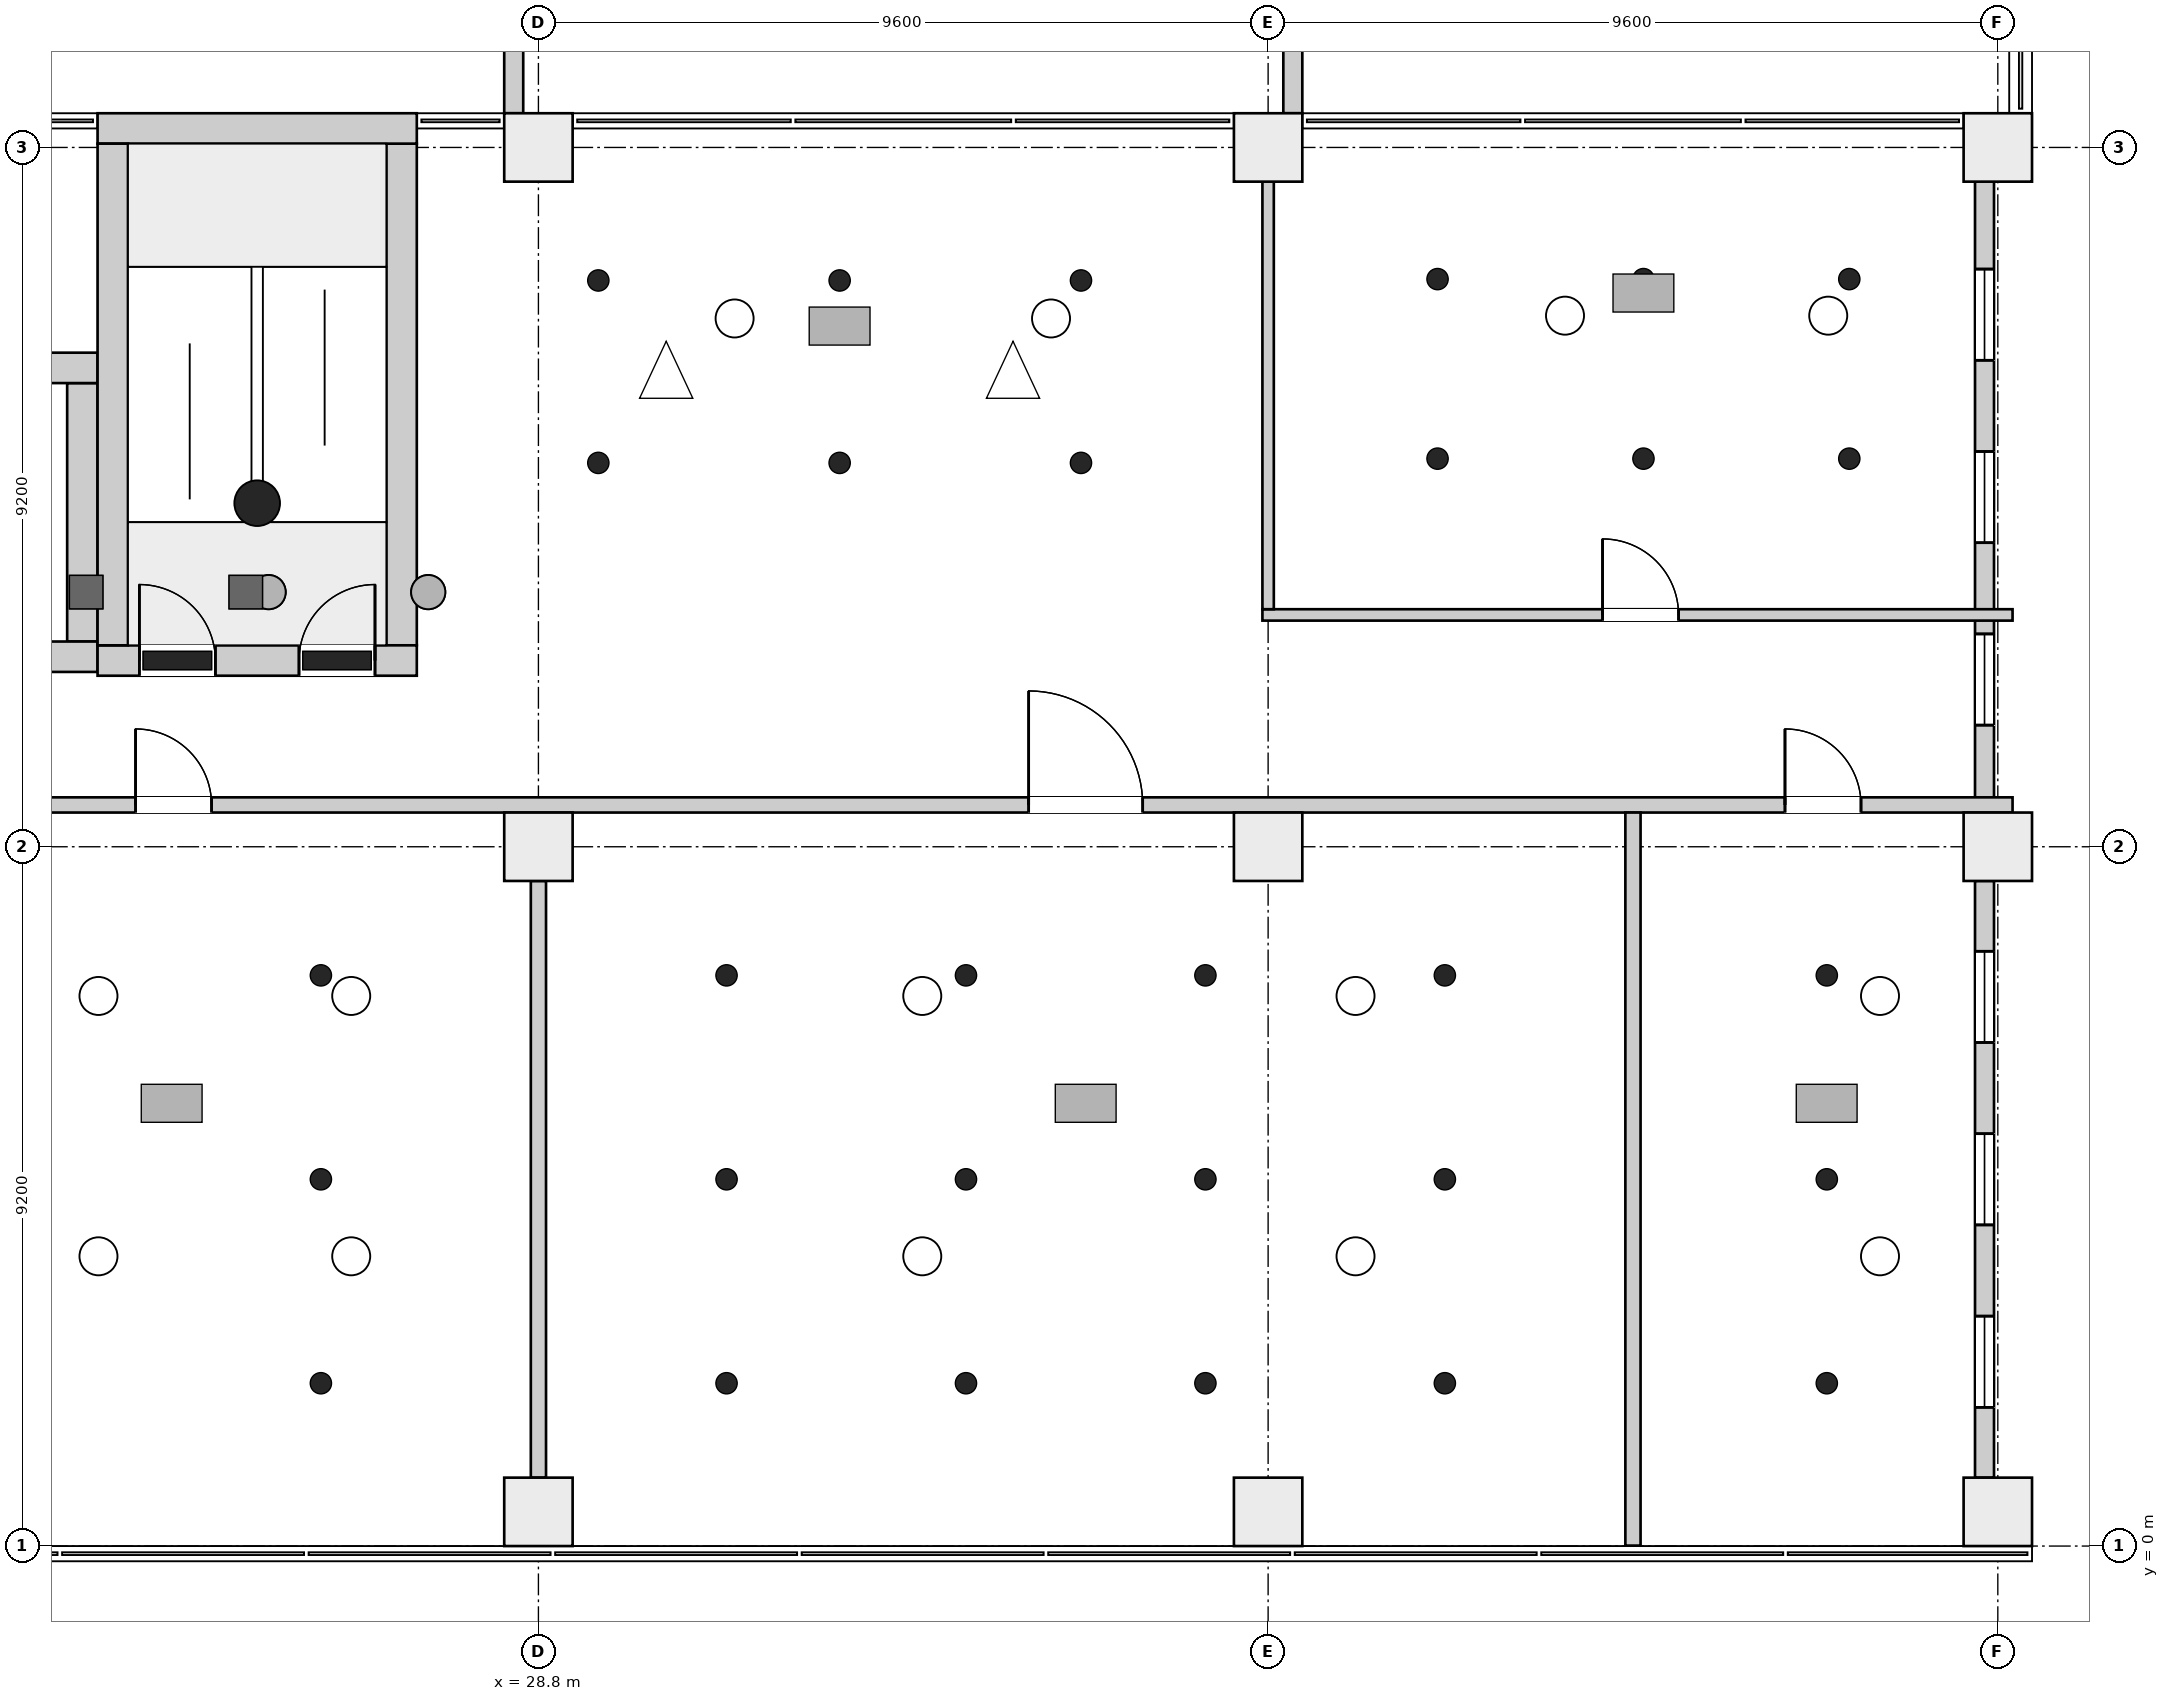
"""IFC4 building model, lengths in metres.
Left out: names, types, materials, properties, quantities, classifications, styles, units other than length and angle.
Written with IfcOpenShell. Run it as: python <this file> out.ifc"""

import sys

from ifc_helpers import new_model, si_unit, direction, frame, frame_2d, origin, origin_2d, place, context, subcontext, project, spatial, rectangle, extrude, element, fill, save


model = new_model("IFC4")
c1 = context("Model", 3, precision=1e-05, world=origin(), true_north=direction((0.0, 1.0)))
c2 = subcontext(c1, "Body", "Model", "MODEL_VIEW")
j1 = project(units=[si_unit("LENGTHUNIT", "METRE"), si_unit("PLANEANGLEUNIT", "RADIAN")], contexts=[c1])
p1 = place(None, origin())
s1 = spatial("IfcSite", under=j1, at=p1, CompositionType="ELEMENT")
p2 = place(p1, origin())
s2 = spatial("IfcBuilding", under=s1, at=p2, CompositionType="ELEMENT")
p3 = place(p2, frame((0.0, 0.0, 48.7)))
s3 = spatial("IfcBuildingStorey", under=s2, at=p3, CompositionType="ELEMENT", Elevation=48.7)
p4 = place(p3, frame((23.0, 11.65, 0.0), z_axis=(0.0, 0.0, 1.0), x_axis=(1.0, 0.0, 0.0)))
e1 = element("IfcWall", 1, at=p4, inside=s3, PredefinedType="SHEAR", context=c2, shape_type="SweptSolid", body=[
    extrude(rectangle(XDim=4.2, YDim=0.4, at=frame_2d((2.1, 0.0))), origin(), (0.0, 0.0, 1.0), 4.2),
])
p5 = place(p4, frame((0.55, 0.0, 0.0)))
e2 = element("IfcOpeningElement", 2, at=p5, cuts=e1, PredefinedType="OPENING", context=c2, shape_type="SweptSolid", body=[
    extrude(rectangle(XDim=1.0, YDim=2.1, at=frame_2d((0.5, 1.05))), frame((0.0, 0.21, 0.0), z_axis=(0.0, -1.0, 0.0), x_axis=(1.0, 0.0, 0.0)), (0.0, 0.0, 1.0), 0.42),
])
p6 = place(p4, frame((2.65, 0.0, 0.0)))
e3 = element("IfcOpeningElement", 3, at=p6, cuts=e1, PredefinedType="OPENING", context=c2, shape_type="SweptSolid", body=[
    extrude(rectangle(XDim=1.0, YDim=2.1, at=frame_2d((0.5, 1.05))), frame((0.0, 0.21, 0.0), z_axis=(0.0, -1.0, 0.0), x_axis=(1.0, 0.0, 0.0)), (0.0, 0.0, 1.0), 0.42),
])
p7 = place(p3, frame((23.0, 18.65, 0.0), z_axis=(0.0, 0.0, 1.0), x_axis=(1.0, 0.0, 0.0)))
e4 = element("IfcWall", 4, at=p7, inside=s3, PredefinedType="SHEAR", context=c2, shape_type="SweptSolid", body=[
    extrude(rectangle(XDim=4.2, YDim=0.4, at=frame_2d((2.1, 0.0))), origin(), (0.0, 0.0, 1.0), 4.2),
])
for number, where, z_axis, x_axis in (
    (5, (23.2, 11.85, 0.0), (0.0, 0.0, 1.0), (0.0, 1.0, 0.0)),
    (6, (27.0, 11.85, 0.0), (0.0, 0.0, 1.0), (0.0, 1.0, 0.0)),
):
    element("IfcWall", number, at=place(p3, frame(where, z_axis=z_axis, x_axis=x_axis)), inside=s3, PredefinedType="SHEAR", context=c2, shape_type="SweptSolid", body=[
        extrude(rectangle(XDim=6.6, YDim=0.4, at=frame_2d((3.3, 0.0))), origin(), (0.0, 0.0, 1.0), 4.2),
    ])
p8 = place(p3, frame((19.9, 11.7, 0.0), z_axis=(0.0, 0.0, 1.0), x_axis=(1.0, 0.0, 0.0)))
e7 = element("IfcWall", 7, at=p8, inside=s3, PredefinedType="SHEAR", context=c2, shape_type="SweptSolid", body=[
    extrude(rectangle(XDim=3.1, YDim=0.4, at=frame_2d((1.55, 0.0))), origin(), (0.0, 0.0, 1.0), 4.2),
])
p9 = place(p3, frame((19.9, 15.5, 0.0), z_axis=(0.0, 0.0, 1.0), x_axis=(1.0, 0.0, 0.0)))
e8 = element("IfcWall", 8, at=p9, inside=s3, PredefinedType="SHEAR", context=c2, shape_type="SweptSolid", body=[
    extrude(rectangle(XDim=3.1, YDim=0.4, at=frame_2d((1.55, 0.0))), origin(), (0.0, 0.0, 1.0), 4.2),
])
p10 = place(p9, frame((0.95, 0.0, 0.0)))
e9 = element("IfcOpeningElement", 9, at=p10, cuts=e8, PredefinedType="OPENING", context=c2, shape_type="SweptSolid", body=[
    extrude(rectangle(XDim=1.2, YDim=2.1, at=frame_2d((0.6, 1.05))), frame((0.0, 0.21, 0.0), z_axis=(0.0, -1.0, 0.0), x_axis=(1.0, 0.0, 0.0)), (0.0, 0.0, 1.0), 0.42),
])
p11 = place(p3, frame((22.8, 11.9, 0.0), z_axis=(0.0, 0.0, 1.0), x_axis=(0.0, 1.0, 0.0)))
e10 = element("IfcWall", 10, at=p11, inside=s3, PredefinedType="SHEAR", context=c2, shape_type="SweptSolid", body=[
    extrude(rectangle(XDim=3.4, YDim=0.4, at=frame_2d((1.7, 0.0))), origin(), (0.0, 0.0, 1.0), 4.2),
])
for number, where, z_axis, x_axis in (
    (11, (28.8, 0.45, 0.0), (0.0, 0.0, 1.0), (1.0, 0.0, 0.0)),
    (12, (38.4, 0.45, 0.0), (0.0, 0.0, 1.0), (1.0, 0.0, 0.0)),
    (13, (48.0, 0.45, 0.0), (0.0, 0.0, 1.0), (1.0, 0.0, 0.0)),
    (14, (28.8, 9.2, 0.0), (0.0, 0.0, 1.0), (1.0, 0.0, 0.0)),
    (15, (38.4, 9.2, 0.0), (0.0, 0.0, 1.0), (1.0, 0.0, 0.0)),
    (16, (48.0, 9.2, 0.0), (0.0, 0.0, 1.0), (1.0, 0.0, 0.0)),
    (17, (28.8, 18.4, 0.0), (0.0, 0.0, 1.0), (1.0, 0.0, 0.0)),
    (18, (38.4, 18.4, 0.0), (0.0, 0.0, 1.0), (1.0, 0.0, 0.0)),
    (19, (48.0, 18.4, 0.0), (0.0, 0.0, 1.0), (1.0, 0.0, 0.0)),
):
    element("IfcColumn", number, at=place(p3, frame(where, z_axis=z_axis, x_axis=x_axis)), inside=s3, PredefinedType="COLUMN", context=c2, shape_type="SweptSolid", body=[
        extrude(rectangle(XDim=0.9, YDim=0.9, at=origin_2d()), origin(), (0.0, 0.0, 1.0), 4.2),
    ])
p12 = place(p3, frame((47.825, 0.9, 0.0), z_axis=(0.0, 0.0, 1.0), x_axis=(0.0, 1.0, 0.0)))
e20 = element("IfcWall", 20, at=p12, inside=s3, PredefinedType="ELEMENTEDWALL", context=c2, shape_type="SweptSolid", body=[
    extrude(rectangle(XDim=7.85, YDim=0.25, at=frame_2d((3.925, 0.0))), origin(), (0.0, 0.0, 1.0), 3.3),
])
p13 = place(p12, frame((0.925, 0.0, 0.6)))
e21 = element("IfcOpeningElement", 21, at=p13, cuts=e20, PredefinedType="OPENING", context=c2, shape_type="SweptSolid", body=[
    extrude(rectangle(XDim=1.2, YDim=2.6, at=frame_2d((0.6, 1.3))), frame((0.0, 0.135, 0.0), z_axis=(0.0, -1.0, 0.0), x_axis=(1.0, 0.0, 0.0)), (0.0, 0.0, 1.0), 0.27),
])
p14 = place(p12, frame((3.325, 0.0, 0.6)))
e22 = element("IfcOpeningElement", 22, at=p14, cuts=e20, PredefinedType="OPENING", context=c2, shape_type="SweptSolid", body=[
    extrude(rectangle(XDim=1.2, YDim=2.6, at=frame_2d((0.6, 1.3))), frame((0.0, 0.135, 0.0), z_axis=(0.0, -1.0, 0.0), x_axis=(1.0, 0.0, 0.0)), (0.0, 0.0, 1.0), 0.27),
])
p15 = place(p12, frame((5.725, 0.0, 0.6)))
e23 = element("IfcOpeningElement", 23, at=p15, cuts=e20, PredefinedType="OPENING", context=c2, shape_type="SweptSolid", body=[
    extrude(rectangle(XDim=1.2, YDim=2.6, at=frame_2d((0.6, 1.3))), frame((0.0, 0.135, 0.0), z_axis=(0.0, -1.0, 0.0), x_axis=(1.0, 0.0, 0.0)), (0.0, 0.0, 1.0), 0.27),
])
p16 = place(p3, frame((47.825, 9.65, 0.0), z_axis=(0.0, 0.0, 1.0), x_axis=(0.0, 1.0, 0.0)))
e24 = element("IfcWall", 24, at=p16, inside=s3, PredefinedType="ELEMENTEDWALL", context=c2, shape_type="SweptSolid", body=[
    extrude(rectangle(XDim=8.3, YDim=0.25, at=frame_2d((4.15, 0.0))), origin(), (0.0, 0.0, 1.0), 3.3),
])
p17 = place(p16, frame((1.15, 0.0, 0.6)))
e25 = element("IfcOpeningElement", 25, at=p17, cuts=e24, PredefinedType="OPENING", context=c2, shape_type="SweptSolid", body=[
    extrude(rectangle(XDim=1.2, YDim=2.6, at=frame_2d((0.6, 1.3))), frame((0.0, 0.135, 0.0), z_axis=(0.0, -1.0, 0.0), x_axis=(1.0, 0.0, 0.0)), (0.0, 0.0, 1.0), 0.27),
])
p18 = place(p16, frame((3.55, 0.0, 0.6)))
e26 = element("IfcOpeningElement", 26, at=p18, cuts=e24, PredefinedType="OPENING", context=c2, shape_type="SweptSolid", body=[
    extrude(rectangle(XDim=1.2, YDim=2.6, at=frame_2d((0.6, 1.3))), frame((0.0, 0.135, 0.0), z_axis=(0.0, -1.0, 0.0), x_axis=(1.0, 0.0, 0.0)), (0.0, 0.0, 1.0), 0.27),
])
p19 = place(p16, frame((5.95, 0.0, 0.6)))
e27 = element("IfcOpeningElement", 27, at=p19, cuts=e24, PredefinedType="OPENING", context=c2, shape_type="SweptSolid", body=[
    extrude(rectangle(XDim=1.2, YDim=2.6, at=frame_2d((0.6, 1.3))), frame((0.0, 0.135, 0.0), z_axis=(0.0, -1.0, 0.0), x_axis=(1.0, 0.0, 0.0)), (0.0, 0.0, 1.0), 0.27),
])
for number, where, z_axis, x_axis in (
    (28, (38.725, 18.85, 4.2), (0.0, 0.0, 1.0), (0.0, 1.0, 0.0)),
    (29, (28.475, 27.15, 4.2), (0.0, 0.0, 1.0), (0.0, -1.0, 0.0)),
):
    element("IfcWall", number, at=place(p3, frame(where, z_axis=z_axis, x_axis=x_axis)), inside=s3, PredefinedType="PARAPET", context=c2, shape_type="SweptSolid", body=[
        extrude(rectangle(XDim=8.3, YDim=0.25, at=frame_2d((4.15, 0.0))), origin(), (0.0, 0.0, 1.0), 1.1),
    ])
p20 = place(p3, frame((4.3, 9.75, 0.0), z_axis=(0.0, 0.0, 1.0), x_axis=(1.0, 0.0, 0.0)))
e30 = element("IfcWall", 30, at=p20, inside=s3, PredefinedType="PARTITIONING", context=c2, shape_type="SweptSolid", body=[
    extrude(rectangle(XDim=43.894, YDim=0.2, at=frame_2d((21.947, 0.0))), origin(), (0.0, 0.0, 1.0), 3.9),
])
p21 = place(p20, frame((7.0, 0.0, 0.0)))
e31 = element("IfcOpeningElement", 31, at=p21, cuts=e30, PredefinedType="OPENING", context=c2, shape_type="SweptSolid", body=[
    extrude(rectangle(XDim=1.0, YDim=2.1, at=frame_2d((0.5, 1.05))), frame((0.0, 0.11, 0.0), z_axis=(0.0, -1.0, 0.0), x_axis=(1.0, 0.0, 0.0)), (0.0, 0.0, 1.0), 0.22),
])
p22 = place(p20, frame((19.2, 0.0, 0.0)))
e32 = element("IfcOpeningElement", 32, at=p22, cuts=e30, PredefinedType="OPENING", context=c2, shape_type="SweptSolid", body=[
    extrude(rectangle(XDim=1.0, YDim=2.1, at=frame_2d((0.5, 1.05))), frame((0.0, 0.11, 0.0), z_axis=(0.0, -1.0, 0.0), x_axis=(1.0, 0.0, 0.0)), (0.0, 0.0, 1.0), 0.22),
])
p23 = place(p20, frame((30.95, 0.0, 0.0)))
e33 = element("IfcOpeningElement", 33, at=p23, cuts=e30, PredefinedType="OPENING", context=c2, shape_type="SweptSolid", body=[
    extrude(rectangle(XDim=1.5, YDim=2.1, at=frame_2d((0.75, 1.05))), frame((0.0, 0.11, 0.0), z_axis=(0.0, -1.0, 0.0), x_axis=(1.0, 0.0, 0.0)), (0.0, 0.0, 1.0), 0.22),
])
p24 = place(p20, frame((40.9, 0.0, 0.0)))
e34 = element("IfcOpeningElement", 34, at=p24, cuts=e30, PredefinedType="OPENING", context=c2, shape_type="SweptSolid", body=[
    extrude(rectangle(XDim=1.0, YDim=2.1, at=frame_2d((0.5, 1.05))), frame((0.0, 0.11, 0.0), z_axis=(0.0, -1.0, 0.0), x_axis=(1.0, 0.0, 0.0)), (0.0, 0.0, 1.0), 0.22),
])
p25 = place(p3, frame((28.8, 0.9, 0.0), z_axis=(0.0, 0.0, 1.0), x_axis=(0.0, 1.0, 0.0)))
e35 = element("IfcWall", 35, at=p25, inside=s3, PredefinedType="PARTITIONING", context=c2, shape_type="SweptSolid", body=[
    extrude(rectangle(XDim=7.85, YDim=0.2, at=frame_2d((3.925, 0.0))), origin(), (0.0, 0.0, 1.0), 3.9),
])
p26 = place(p3, frame((38.325, 12.25, 0.0), z_axis=(0.0, 0.0, 1.0), x_axis=(1.0, 0.0, 0.0)))
e36 = element("IfcWall", 36, at=p26, inside=s3, PredefinedType="PARTITIONING", context=c2, shape_type="SweptSolid", body=[
    extrude(rectangle(XDim=9.869, YDim=0.15, at=frame_2d((4.935, 0.0))), origin(), (0.0, 0.0, 1.0), 3.9),
])
p27 = place(p26, frame((4.475, 0.0, 0.0)))
e37 = element("IfcOpeningElement", 37, at=p27, cuts=e36, PredefinedType="OPENING", context=c2, shape_type="SweptSolid", body=[
    extrude(rectangle(XDim=1.0, YDim=2.1, at=frame_2d((0.5, 1.05))), frame((0.0, 0.085, 0.0), z_axis=(0.0, -1.0, 0.0), x_axis=(1.0, 0.0, 0.0)), (0.0, 0.0, 1.0), 0.17),
])
p28 = place(p3, frame((38.4, 12.325, 0.0), z_axis=(0.0, 0.0, 1.0), x_axis=(0.0, 1.0, 0.0)))
e38 = element("IfcWall", 38, at=p28, inside=s3, PredefinedType="PARTITIONING", context=c2, shape_type="SweptSolid", body=[
    extrude(rectangle(XDim=5.625, YDim=0.15, at=frame_2d((2.812, 0.0))), origin(), (0.0, 0.0, 1.0), 3.9),
])
p29 = place(p3, frame((43.2, 0.006, 0.0), z_axis=(0.0, 0.0, 1.0), x_axis=(0.0, 1.0, 0.0)))
e39 = element("IfcWall", 39, at=p29, inside=s3, PredefinedType="PARTITIONING", context=c2, shape_type="SweptSolid", body=[
    extrude(rectangle(XDim=9.644, YDim=0.2, at=frame_2d((4.822, 0.0))), origin(), (0.0, 0.0, 1.0), 3.9),
])
p30 = place(p13, origin())
e40 = element("IfcWindow", 40, at=p30, inside=s3, PartitioningType="SINGLE_PANEL", PredefinedType="WINDOW", context=c2, shape_type="SweptSolid", body=[
    extrude(rectangle(XDim=1.2, YDim=2.6, at=frame_2d((0.6, 1.3))), frame((0.0, 0.03, 0.0), z_axis=(0.0, -1.0, 0.0), x_axis=(1.0, 0.0, 0.0)), (0.0, 0.0, 1.0), 0.06),
])
fill(e21, e40)
p31 = place(p14, origin())
e41 = element("IfcWindow", 41, at=p31, inside=s3, PartitioningType="SINGLE_PANEL", PredefinedType="WINDOW", context=c2, shape_type="SweptSolid", body=[
    extrude(rectangle(XDim=1.2, YDim=2.6, at=frame_2d((0.6, 1.3))), frame((0.0, 0.03, 0.0), z_axis=(0.0, -1.0, 0.0), x_axis=(1.0, 0.0, 0.0)), (0.0, 0.0, 1.0), 0.06),
])
fill(e22, e41)
p32 = place(p15, origin())
e42 = element("IfcWindow", 42, at=p32, inside=s3, PartitioningType="SINGLE_PANEL", PredefinedType="WINDOW", context=c2, shape_type="SweptSolid", body=[
    extrude(rectangle(XDim=1.2, YDim=2.6, at=frame_2d((0.6, 1.3))), frame((0.0, 0.03, 0.0), z_axis=(0.0, -1.0, 0.0), x_axis=(1.0, 0.0, 0.0)), (0.0, 0.0, 1.0), 0.06),
])
fill(e23, e42)
p33 = place(p17, origin())
e43 = element("IfcWindow", 43, at=p33, inside=s3, PartitioningType="SINGLE_PANEL", PredefinedType="WINDOW", context=c2, shape_type="SweptSolid", body=[
    extrude(rectangle(XDim=1.2, YDim=2.6, at=frame_2d((0.6, 1.3))), frame((0.0, 0.03, 0.0), z_axis=(0.0, -1.0, 0.0), x_axis=(1.0, 0.0, 0.0)), (0.0, 0.0, 1.0), 0.06),
])
fill(e25, e43)
p34 = place(p18, origin())
e44 = element("IfcWindow", 44, at=p34, inside=s3, PartitioningType="SINGLE_PANEL", PredefinedType="WINDOW", context=c2, shape_type="SweptSolid", body=[
    extrude(rectangle(XDim=1.2, YDim=2.6, at=frame_2d((0.6, 1.3))), frame((0.0, 0.03, 0.0), z_axis=(0.0, -1.0, 0.0), x_axis=(1.0, 0.0, 0.0)), (0.0, 0.0, 1.0), 0.06),
])
fill(e26, e44)
p35 = place(p19, origin())
e45 = element("IfcWindow", 45, at=p35, inside=s3, PartitioningType="SINGLE_PANEL", PredefinedType="WINDOW", context=c2, shape_type="SweptSolid", body=[
    extrude(rectangle(XDim=1.2, YDim=2.6, at=frame_2d((0.6, 1.3))), frame((0.0, 0.03, 0.0), z_axis=(0.0, -1.0, 0.0), x_axis=(1.0, 0.0, 0.0)), (0.0, 0.0, 1.0), 0.06),
])
fill(e27, e45)
p36 = place(p5, origin())
e46 = element("IfcDoor", 46, at=p36, inside=s3, OperationType="SINGLE_SWING_RIGHT", PredefinedType="DOOR", context=c2, shape_type="SweptSolid", body=[
    extrude(rectangle(XDim=1.0, YDim=2.1, at=frame_2d((0.5, 1.05))), frame((0.0, 0.025, 0.0), z_axis=(0.0, -1.0, 0.0), x_axis=(1.0, 0.0, 0.0)), (0.0, 0.0, 1.0), 0.05),
])
fill(e2, e46)
p37 = place(p6, origin())
e47 = element("IfcDoor", 47, at=p37, inside=s3, OperationType="SINGLE_SWING_LEFT", PredefinedType="DOOR", context=c2, shape_type="SweptSolid", body=[
    extrude(rectangle(XDim=1.0, YDim=2.1, at=frame_2d((0.5, 1.05))), frame((0.0, 0.025, 0.0), z_axis=(0.0, -1.0, 0.0), x_axis=(1.0, 0.0, 0.0)), (0.0, 0.0, 1.0), 0.05),
])
fill(e3, e47)
p38 = place(p22, origin())
e48 = element("IfcDoor", 48, at=p38, inside=s3, OperationType="SINGLE_SWING_RIGHT", PredefinedType="DOOR", context=c2, shape_type="SweptSolid", body=[
    extrude(rectangle(XDim=1.0, YDim=2.1, at=frame_2d((0.5, 1.05))), frame((0.0, 0.025, 0.0), z_axis=(0.0, -1.0, 0.0), x_axis=(1.0, 0.0, 0.0)), (0.0, 0.0, 1.0), 0.05),
])
fill(e32, e48)
p39 = place(p23, origin())
e49 = element("IfcDoor", 49, at=p39, inside=s3, OperationType="DOUBLE_DOOR_SINGLE_SWING", PredefinedType="DOOR", context=c2, shape_type="SweptSolid", body=[
    extrude(rectangle(XDim=1.5, YDim=2.1, at=frame_2d((0.75, 1.05))), frame((0.0, 0.025, 0.0), z_axis=(0.0, -1.0, 0.0), x_axis=(1.0, 0.0, 0.0)), (0.0, 0.0, 1.0), 0.05),
])
fill(e33, e49)
p40 = place(p24, origin())
e50 = element("IfcDoor", 50, at=p40, inside=s3, OperationType="SINGLE_SWING_LEFT", PredefinedType="DOOR", context=c2, shape_type="SweptSolid", body=[
    extrude(rectangle(XDim=1.0, YDim=2.1, at=frame_2d((0.5, 1.05))), frame((0.0, 0.025, 0.0), z_axis=(0.0, -1.0, 0.0), x_axis=(1.0, 0.0, 0.0)), (0.0, 0.0, 1.0), 0.05),
])
fill(e34, e50)
p41 = place(p27, origin())
e51 = element("IfcDoor", 51, at=p41, inside=s3, OperationType="SINGLE_SWING_RIGHT", PredefinedType="DOOR", context=c2, shape_type="SweptSolid", body=[
    extrude(rectangle(XDim=1.0, YDim=2.1, at=frame_2d((0.5, 1.05))), frame((0.0, 0.025, 0.0), z_axis=(0.0, -1.0, 0.0), x_axis=(1.0, 0.0, 0.0)), (0.0, 0.0, 1.0), 0.05),
])
fill(e37, e51)
save(model, sys.argv[1])
